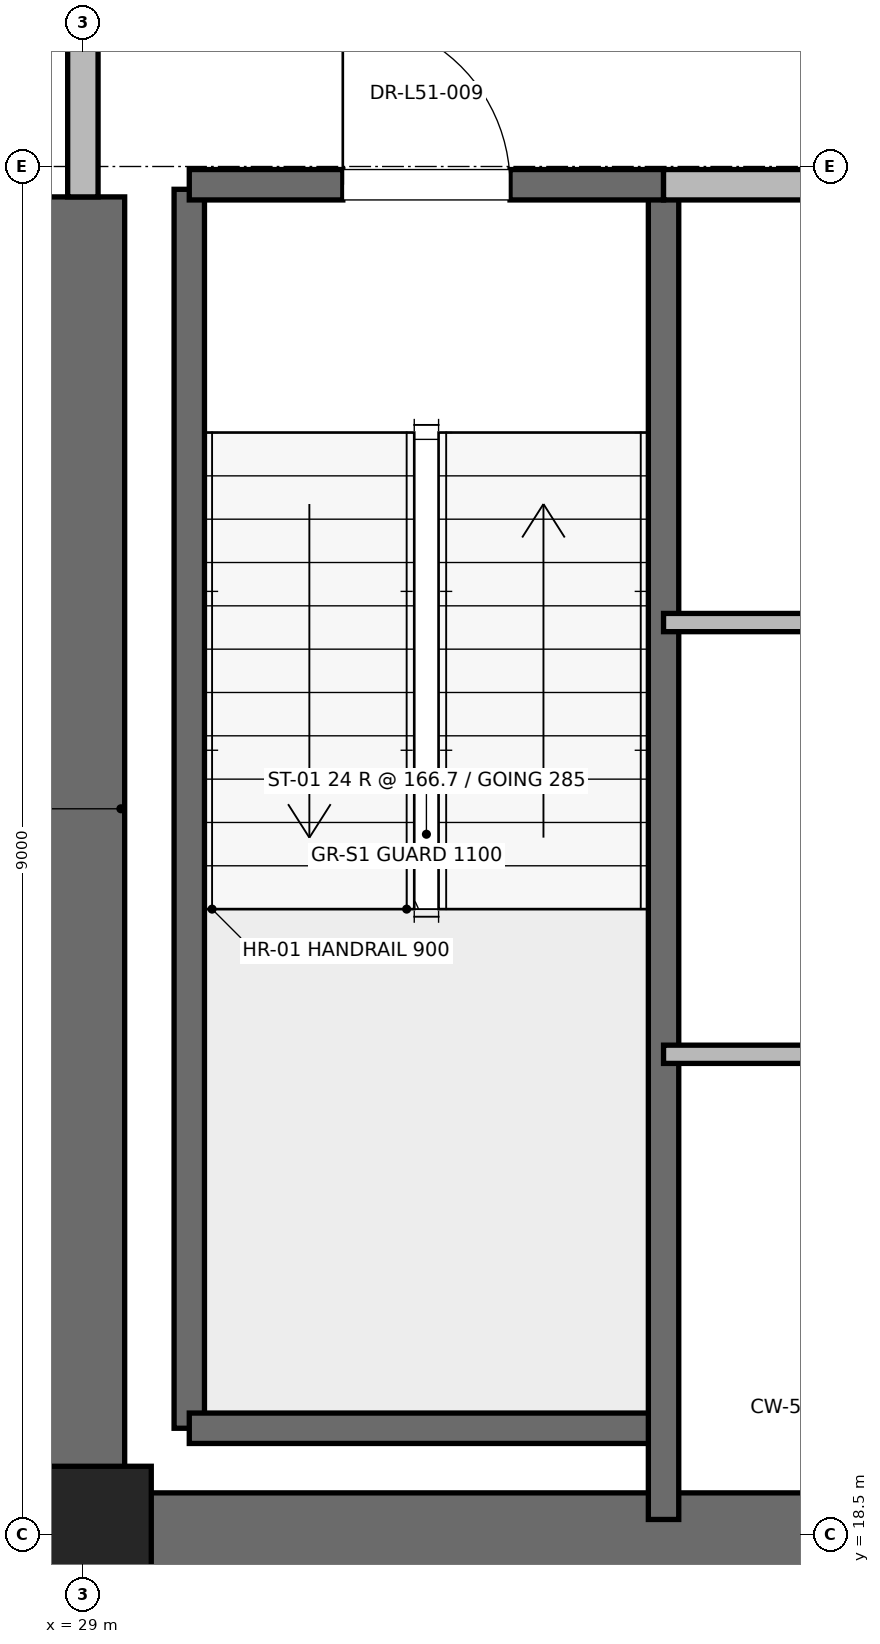
"""IFC4 building model, lengths in metres.
Left out: names, types, materials, properties, quantities, classifications, styles, units other than length and angle.
Written with IfcOpenShell. Run it as: python <this file> out.ifc"""

import sys

from ifc_helpers import new_model, si_unit, direction, frame, frame_2d, origin, origin_2d, place, context, subcontext, project, spatial, rectangle, extrude, element, fill, save


model = new_model("IFC4")
c1 = context("Model", 3, precision=1e-05, world=origin(), true_north=direction((0.0, 1.0)))
c2 = subcontext(c1, "Body", "Model", "MODEL_VIEW")
j1 = project(units=[si_unit("LENGTHUNIT", "METRE"), si_unit("PLANEANGLEUNIT", "RADIAN")], contexts=[c1])
p1 = place(None, origin())
s1 = spatial("IfcSite", under=j1, at=p1, CompositionType="ELEMENT")
p2 = place(p1, origin())
s2 = spatial("IfcBuilding", under=s1, at=p2, CompositionType="ELEMENT")
p3 = place(p2, frame((0.0, 0.0, 221.2)))
s3 = spatial("IfcBuildingStorey", under=s2, at=p3, CompositionType="ELEMENT", Elevation=221.2)
p4 = place(p3, frame((29.0, 18.5, 0.0), z_axis=(0.0, 0.0, 1.0), x_axis=(1.0, 0.0, 0.0)))
e1 = element("IfcColumn", 1, at=p4, inside=s3, PredefinedType="PILASTER", context=c2, shape_type="SweptSolid", body=[
    extrude(rectangle(XDim=0.9, YDim=0.9, at=origin_2d()), origin(), (0.0, 0.0, 1.0), 4.0),
])
p5 = place(p3, frame((29.0, 18.5, 0.0), z_axis=(0.0, 0.0, 1.0), x_axis=(1.0, 0.0, 0.0)))
e2 = element("IfcWall", 2, at=p5, inside=s3, PredefinedType="SHEAR", context=c2, shape_type="SweptSolid", body=[
    extrude(rectangle(XDim=9.2, YDim=0.55, at=frame_2d((4.6, 0.0))), origin(), (0.0, 0.0, 1.0), 3.775),
])
p6 = place(p3, frame((29.0, 18.5, 0.0), z_axis=(0.0, 0.0, 1.0), x_axis=(0.0, 1.0, 0.0)))
e3 = element("IfcWall", 3, at=p6, inside=s3, PredefinedType="SHEAR", context=c2, shape_type="SweptSolid", body=[
    extrude(rectangle(XDim=8.8, YDim=0.55, at=frame_2d((4.4, 0.0))), origin(), (0.0, 0.0, 1.0), 3.775),
])
p7 = place(p3, frame((29.7, 19.2, 0.0), z_axis=(0.0, 0.0, 1.0), x_axis=(0.0, 1.0, 0.0)))
e4 = element("IfcWall", 4, at=p7, inside=s3, PredefinedType="SOLIDWALL", context=c2, shape_type="SweptSolid", body=[
    extrude(rectangle(XDim=8.15, YDim=0.2, at=frame_2d((4.075, 0.0))), origin(), (0.0, 0.0, 1.0), 3.775),
])
p8 = place(p3, frame((29.7, 19.2, 0.0), z_axis=(0.0, 0.0, 1.0), x_axis=(1.0, 0.0, 0.0)))
e5 = element("IfcWall", 5, at=p8, inside=s3, PredefinedType="SOLIDWALL", context=c2, shape_type="SweptSolid", body=[
    extrude(rectangle(XDim=3.12, YDim=0.2, at=frame_2d((1.56, 0.0))), origin(), (0.0, 0.0, 1.0), 3.775),
])
p9 = place(p3, frame((32.82, 18.6, 0.0), z_axis=(0.0, 0.0, 1.0), x_axis=(0.0, 1.0, 0.0)))
e6 = element("IfcWall", 6, at=p9, inside=s3, PredefinedType="SOLIDWALL", context=c2, shape_type="SweptSolid", body=[
    extrude(rectangle(XDim=8.78, YDim=0.2, at=frame_2d((4.39, 0.0))), origin(), (0.0, 0.0, 1.0), 3.775),
])
p10 = place(p3, frame((29.7, 27.38, 0.0), z_axis=(0.0, 0.0, 1.0), x_axis=(1.0, 0.0, 0.0)))
e7 = element("IfcWall", 7, at=p10, inside=s3, PredefinedType="SOLIDWALL", context=c2, shape_type="SweptSolid", body=[
    extrude(rectangle(XDim=3.12, YDim=0.2, at=frame_2d((1.56, 0.0))), origin(), (0.0, 0.0, 1.0), 3.775),
])
p11 = place(p10, frame((1.01, 0.0, 0.0)))
e8 = element("IfcOpeningElement", 8, at=p11, cuts=e7, PredefinedType="OPENING", context=c2, shape_type="SweptSolid", body=[
    extrude(rectangle(XDim=1.1, YDim=2.15, at=frame_2d((0.55, 1.075))), frame((0.0, 0.1, 0.0), z_axis=(0.0, -1.0, 0.0), x_axis=(1.0, 0.0, 0.0)), (0.0, 0.0, 1.0), 0.2),
])
p12 = place(p3, frame((29.0, 27.3, 0.0), z_axis=(0.0, 0.0, 1.0), x_axis=(0.0, 1.0, 0.0)))
e9 = element("IfcWall", 9, at=p12, inside=s3, PredefinedType="PARTITIONING", context=c2, shape_type="SweptSolid", body=[
    extrude(rectangle(XDim=3.4, YDim=0.2, at=frame_2d((1.7, 0.0))), origin(), (0.0, 0.0, 1.0), 2.755),
])
p13 = place(p12, frame((1.125, 0.0, 0.0)))
e10 = element("IfcOpeningElement", 10, at=p13, cuts=e9, PredefinedType="OPENING", context=c2, shape_type="SweptSolid", body=[
    extrude(rectangle(XDim=1.15, YDim=2.2, at=frame_2d((0.575, 1.1))), frame((0.0, 0.1, 0.0), z_axis=(0.0, -1.0, 0.0), x_axis=(1.0, 0.0, 0.0)), (0.0, 0.0, 1.0), 0.2),
])
p14 = place(p3, frame((32.82, 27.38, 0.0), z_axis=(0.0, 0.0, 1.0), x_axis=(1.0, 0.0, 0.0)))
e11 = element("IfcWall", 11, at=p14, inside=s3, PredefinedType="PARTITIONING", context=c2, shape_type="SweptSolid", body=[
    extrude(rectangle(XDim=5.62, YDim=0.2, at=frame_2d((2.81, 0.0))), origin(), (0.0, 0.0, 1.0), 3.775),
])
for number, where, z_axis, x_axis in (
    (12, (32.82, 21.66, 0.0), (0.0, 0.0, 1.0), (1.0, 0.0, 0.0)),
    (13, (32.82, 24.5, 0.0), (0.0, 0.0, 1.0), (1.0, 0.0, 0.0)),
):
    element("IfcWall", number, at=place(p3, frame(where, z_axis=z_axis, x_axis=x_axis)), inside=s3, PredefinedType="PARTITIONING", context=c2, shape_type="SweptSolid", body=[
        extrude(rectangle(XDim=5.23, YDim=0.12, at=frame_2d((2.615, 0.0))), origin(), (0.0, 0.0, 1.0), 2.85),
    ])
p15 = place(p11, origin())
e14 = element("IfcDoor", 14, at=p15, inside=s3, OperationType="SINGLE_SWING_LEFT", PredefinedType="DOOR", context=c2, shape_type="SweptSolid", body=[
    extrude(rectangle(XDim=1.1, YDim=2.15, at=frame_2d((0.55, 1.075))), frame((0.0, 0.025, 0.0), z_axis=(0.0, -1.0, 0.0), x_axis=(1.0, 0.0, 0.0)), (0.0, 0.0, 1.0), 0.05),
])
fill(e8, e14)
save(model, sys.argv[1])
